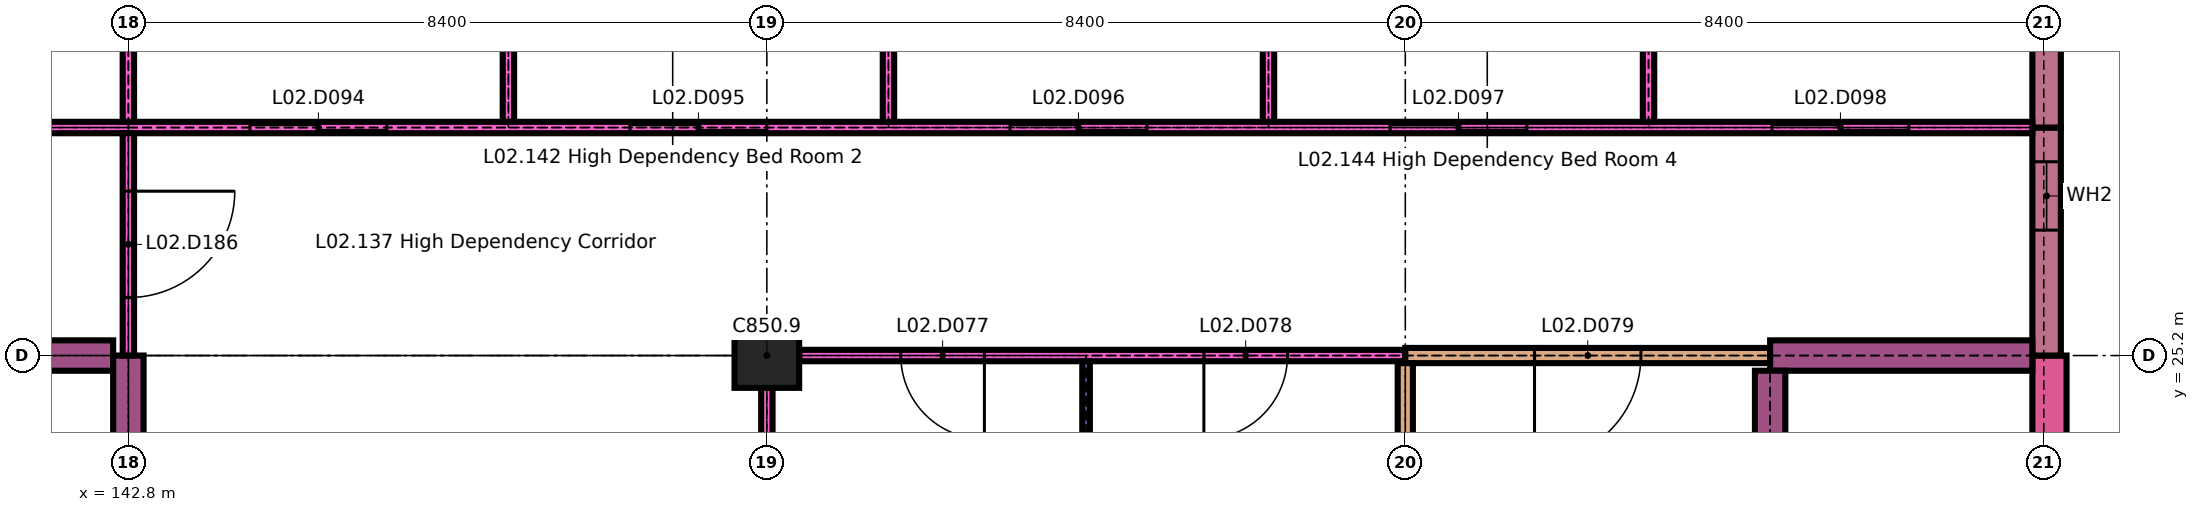
"""IFC4 building model, lengths in metres.
Left out: names, types, materials, properties, quantities, classifications, styles, units other than length and angle.
Written with IfcOpenShell. Run it as: python <this file> out.ifc"""

import sys

from ifc_helpers import new_model, si_unit, direction, frame, frame_2d, origin, origin_2d, place, context, subcontext, project, spatial, rectangle, extrude, element, fill, save


model = new_model("IFC4")
c1 = context("Model", 3, precision=1e-05, world=origin(), true_north=direction((0.0, 1.0)))
c2 = subcontext(c1, "Body", "Model", "MODEL_VIEW")
j1 = project(units=[si_unit("LENGTHUNIT", "METRE"), si_unit("PLANEANGLEUNIT", "RADIAN")], contexts=[c1])
p1 = place(None, origin())
s1 = spatial("IfcSite", under=j1, at=p1, CompositionType="ELEMENT")
p2 = place(p1, origin())
s2 = spatial("IfcBuilding", under=s1, at=p2, CompositionType="ELEMENT")
p3 = place(p2, frame((0.0, 0.0, 8.4)))
s3 = spatial("IfcBuildingStorey", under=s2, at=p3, CompositionType="ELEMENT", Elevation=8.4)
p4 = place(p3, frame((151.2, 25.2, 0.0), z_axis=(0.0, 0.0, 1.0), x_axis=(1.0, 0.0, 0.0)))
e1 = element("IfcColumn", 1, at=p4, inside=s3, PredefinedType="COLUMN", context=c2, shape_type="SweptSolid", body=[
    extrude(rectangle(XDim=0.85, YDim=0.85, at=origin_2d()), origin(), (0.0, 0.0, 1.0), 4.2),
])
p5 = place(p3, frame((168.075, 21.35, 0.0), z_axis=(0.0, 0.0, 1.0), x_axis=(0.0, 1.0, 0.0)))
e2 = element("IfcWall", 2, at=p5, inside=s3, PredefinedType="SOLIDWALL", context=c2, shape_type="SweptSolid", body=[
    extrude(rectangle(XDim=3.85, YDim=0.45, at=frame_2d((1.925, 0.0))), origin(), (0.0, 0.0, 1.0), 4.2),
])
p6 = place(p3, frame((168.038, 25.2, 0.0), z_axis=(0.0, 0.0, 1.0), x_axis=(0.0, 1.0, 0.0)))
e3 = element("IfcWall", 3, at=p6, inside=s3, PredefinedType="SOLIDWALL", context=c2, shape_type="SweptSolid", body=[
    extrude(rectangle(XDim=3.0, YDim=0.375, at=frame_2d((1.5, 0.0))), origin(), (0.0, 0.0, 1.0), 3.9),
])
p7 = place(p6, frame((1.65, 0.0, 0.9)))
e4 = element("IfcOpeningElement", 4, at=p7, cuts=e3, PredefinedType="OPENING", context=c2, shape_type="SweptSolid", body=[
    extrude(rectangle(XDim=0.9, YDim=2.1, at=frame_2d((0.45, 1.05))), frame((0.0, 0.198, 0.0), z_axis=(0.0, -1.0, 0.0), x_axis=(1.0, 0.0, 0.0)), (0.0, 0.0, 1.0), 0.395),
])
p8 = place(p3, frame((168.038, 28.2, 0.0), z_axis=(0.0, 0.0, 1.0), x_axis=(0.0, 1.0, 0.0)))
e5 = element("IfcWall", 5, at=p8, inside=s3, PredefinedType="SOLIDWALL", context=c2, shape_type="SweptSolid", body=[
    extrude(rectangle(XDim=4.975, YDim=0.375, at=frame_2d((2.488, 0.0))), origin(), (0.0, 0.0, 1.0), 3.9),
])
p9 = place(p8, frame((2.25, 0.0, 0.9)))
e6 = element("IfcOpeningElement", 6, at=p9, cuts=e5, PredefinedType="OPENING", context=c2, shape_type="SweptSolid", body=[
    extrude(rectangle(XDim=2.1, YDim=2.1, at=frame_2d((1.05, 1.05))), frame((0.0, 0.198, 0.0), z_axis=(0.0, -1.0, 0.0), x_axis=(1.0, 0.0, 0.0)), (0.0, 0.0, 1.0), 0.395),
])
p10 = place(p3, frame((117.6, 25.2, 0.0), z_axis=(0.0, 0.0, 1.0), x_axis=(1.0, 0.0, 0.0)))
e7 = element("IfcWall", 7, at=p10, inside=s3, PredefinedType="SHEAR", context=c2, shape_type="SweptSolid", body=[
    extrude(rectangle(XDim=25.0, YDim=0.4, at=frame_2d((12.5, 0.0))), origin(), (0.0, 0.0, 1.0), 4.2),
])
p11 = place(p3, frame((151.625, 25.2, 0.0), z_axis=(0.0, 0.0, 1.0), x_axis=(1.0, 0.0, 0.0)))
e8 = element("IfcWall", 8, at=p11, inside=s3, PredefinedType="PARTITIONING", context=c2, shape_type="SweptSolid", body=[
    extrude(rectangle(XDim=7.975, YDim=0.15, at=frame_2d((3.988, 0.0))), origin(), (0.0, 0.0, 1.0), 4.2),
])
p12 = place(p11, frame((1.337, 0.0, 0.0)))
e9 = element("IfcOpeningElement", 9, at=p12, cuts=e8, PredefinedType="OPENING", context=c2, shape_type="SweptSolid", body=[
    extrude(rectangle(XDim=1.1, YDim=2.1, at=frame_2d((0.55, 1.05))), frame((0.0, 0.085, 0.0), z_axis=(0.0, -1.0, 0.0), x_axis=(1.0, 0.0, 0.0)), (0.0, 0.0, 1.0), 0.17),
])
p13 = place(p11, frame((5.325, 0.0, 0.0)))
e10 = element("IfcOpeningElement", 10, at=p13, cuts=e8, PredefinedType="OPENING", context=c2, shape_type="SweptSolid", body=[
    extrude(rectangle(XDim=1.1, YDim=2.1, at=frame_2d((0.55, 1.05))), frame((0.0, 0.085, 0.0), z_axis=(0.0, -1.0, 0.0), x_axis=(1.0, 0.0, 0.0)), (0.0, 0.0, 1.0), 0.17),
])
p14 = place(p3, frame((159.6, 25.2, 0.0), z_axis=(0.0, 0.0, 1.0), x_axis=(1.0, 0.0, 0.0)))
e11 = element("IfcWall", 11, at=p14, inside=s3, PredefinedType="PARTITIONING", context=c2, shape_type="SweptSolid", body=[
    extrude(rectangle(XDim=4.8, YDim=0.2, at=frame_2d((2.4, 0.0))), origin(), (0.0, 0.0, 1.0), 4.2),
])
p15 = place(p14, frame((1.7, 0.0, 0.0)))
e12 = element("IfcOpeningElement", 12, at=p15, cuts=e11, PredefinedType="OPENING", context=c2, shape_type="SweptSolid", body=[
    extrude(rectangle(XDim=1.4, YDim=2.1, at=frame_2d((0.7, 1.05))), frame((0.0, 0.11, 0.0), z_axis=(0.0, -1.0, 0.0), x_axis=(1.0, 0.0, 0.0)), (0.0, 0.0, 1.0), 0.22),
])
p16 = place(p3, frame((164.4, 25.2, 0.0), z_axis=(0.0, 0.0, 1.0), x_axis=(1.0, 0.0, 0.0)))
e13 = element("IfcWall", 13, at=p16, inside=s3, PredefinedType="SHEAR", context=c2, shape_type="SweptSolid", body=[
    extrude(rectangle(XDim=3.45, YDim=0.4, at=frame_2d((1.725, 0.0))), origin(), (0.0, 0.0, 1.0), 4.2),
])
p17 = place(p3, frame((117.7, 28.2, 0.0), z_axis=(0.0, 0.0, 1.0), x_axis=(1.0, 0.0, 0.0)))
e14 = element("IfcWall", 14, at=p17, inside=s3, PredefinedType="PARTITIONING", context=c2, shape_type="SweptSolid", body=[
    extrude(rectangle(XDim=50.15, YDim=0.15, at=frame_2d((25.075, 0.0))), origin(), (0.0, 0.0, 1.0), 4.2),
])
p18 = place(p17, frame((1.55, 0.0, 0.0)))
e15 = element("IfcOpeningElement", 15, at=p18, cuts=e14, PredefinedType="OPENING", context=c2, shape_type="SweptSolid", body=[
    extrude(rectangle(XDim=1.8, YDim=2.4, at=frame_2d((0.9, 1.2))), frame((0.0, 0.085, 0.0), z_axis=(0.0, -1.0, 0.0), x_axis=(1.0, 0.0, 0.0)), (0.0, 0.0, 1.0), 0.17),
])
p19 = place(p17, frame((6.5, 0.0, 0.0)))
e16 = element("IfcOpeningElement", 16, at=p19, cuts=e14, PredefinedType="OPENING", context=c2, shape_type="SweptSolid", body=[
    extrude(rectangle(XDim=1.8, YDim=2.4, at=frame_2d((0.9, 1.2))), frame((0.0, 0.085, 0.0), z_axis=(0.0, -1.0, 0.0), x_axis=(1.0, 0.0, 0.0)), (0.0, 0.0, 1.0), 0.17),
])
p20 = place(p17, frame((11.5, 0.0, 0.0)))
e17 = element("IfcOpeningElement", 17, at=p20, cuts=e14, PredefinedType="OPENING", context=c2, shape_type="SweptSolid", body=[
    extrude(rectangle(XDim=1.8, YDim=2.4, at=frame_2d((0.9, 1.2))), frame((0.0, 0.085, 0.0), z_axis=(0.0, -1.0, 0.0), x_axis=(1.0, 0.0, 0.0)), (0.0, 0.0, 1.0), 0.17),
])
p21 = place(p17, frame((16.5, 0.0, 0.0)))
e18 = element("IfcOpeningElement", 18, at=p21, cuts=e14, PredefinedType="OPENING", context=c2, shape_type="SweptSolid", body=[
    extrude(rectangle(XDim=1.8, YDim=2.4, at=frame_2d((0.9, 1.2))), frame((0.0, 0.085, 0.0), z_axis=(0.0, -1.0, 0.0), x_axis=(1.0, 0.0, 0.0)), (0.0, 0.0, 1.0), 0.17),
])
p22 = place(p17, frame((21.95, 0.0, 0.0)))
e19 = element("IfcOpeningElement", 19, at=p22, cuts=e14, PredefinedType="OPENING", context=c2, shape_type="SweptSolid", body=[
    extrude(rectangle(XDim=1.1, YDim=2.1, at=frame_2d((0.55, 1.05))), frame((0.0, 0.085, 0.0), z_axis=(0.0, -1.0, 0.0), x_axis=(1.0, 0.0, 0.0)), (0.0, 0.0, 1.0), 0.17),
])
p23 = place(p17, frame((26.7, 0.0, 0.0)))
e20 = element("IfcOpeningElement", 20, at=p23, cuts=e14, PredefinedType="OPENING", context=c2, shape_type="SweptSolid", body=[
    extrude(rectangle(XDim=1.8, YDim=2.4, at=frame_2d((0.9, 1.2))), frame((0.0, 0.085, 0.0), z_axis=(0.0, -1.0, 0.0), x_axis=(1.0, 0.0, 0.0)), (0.0, 0.0, 1.0), 0.17),
])
p24 = place(p17, frame((31.7, 0.0, 0.0)))
e21 = element("IfcOpeningElement", 21, at=p24, cuts=e14, PredefinedType="OPENING", context=c2, shape_type="SweptSolid", body=[
    extrude(rectangle(XDim=1.8, YDim=2.4, at=frame_2d((0.9, 1.2))), frame((0.0, 0.085, 0.0), z_axis=(0.0, -1.0, 0.0), x_axis=(1.0, 0.0, 0.0)), (0.0, 0.0, 1.0), 0.17),
])
p25 = place(p17, frame((36.7, 0.0, 0.0)))
e22 = element("IfcOpeningElement", 22, at=p25, cuts=e14, PredefinedType="OPENING", context=c2, shape_type="SweptSolid", body=[
    extrude(rectangle(XDim=1.8, YDim=2.4, at=frame_2d((0.9, 1.2))), frame((0.0, 0.085, 0.0), z_axis=(0.0, -1.0, 0.0), x_axis=(1.0, 0.0, 0.0)), (0.0, 0.0, 1.0), 0.17),
])
p26 = place(p17, frame((41.7, 0.0, 0.0)))
e23 = element("IfcOpeningElement", 23, at=p26, cuts=e14, PredefinedType="OPENING", context=c2, shape_type="SweptSolid", body=[
    extrude(rectangle(XDim=1.8, YDim=2.4, at=frame_2d((0.9, 1.2))), frame((0.0, 0.085, 0.0), z_axis=(0.0, -1.0, 0.0), x_axis=(1.0, 0.0, 0.0)), (0.0, 0.0, 1.0), 0.17),
])
p27 = place(p17, frame((46.725, 0.0, 0.0)))
e24 = element("IfcOpeningElement", 24, at=p27, cuts=e14, PredefinedType="OPENING", context=c2, shape_type="SweptSolid", body=[
    extrude(rectangle(XDim=1.8, YDim=2.4, at=frame_2d((0.9, 1.2))), frame((0.0, 0.085, 0.0), z_axis=(0.0, -1.0, 0.0), x_axis=(1.0, 0.0, 0.0)), (0.0, 0.0, 1.0), 0.17),
])
p28 = place(p3, frame((142.8, 21.6, 0.0), z_axis=(0.0, 0.0, 1.0), x_axis=(0.0, 1.0, 0.0)))
e25 = element("IfcWall", 25, at=p28, inside=s3, PredefinedType="SHEAR", context=c2, shape_type="SweptSolid", body=[
    extrude(rectangle(XDim=3.6, YDim=0.4, at=frame_2d((1.8, 0.0))), origin(), (0.0, 0.0, 1.0), 4.2),
])
p29 = place(p3, frame((142.8, 25.2, 0.0), z_axis=(0.0, 0.0, 1.0), x_axis=(0.0, 1.0, 0.0)))
e26 = element("IfcWall", 26, at=p29, inside=s3, PredefinedType="PARTITIONING", context=c2, shape_type="SweptSolid", body=[
    extrude(rectangle(XDim=2.925, YDim=0.15, at=frame_2d((1.462, 0.0))), origin(), (0.0, 0.0, 1.0), 4.2),
])
p30 = place(p29, frame((0.762, 0.0, 0.0)))
e27 = element("IfcOpeningElement", 27, at=p30, cuts=e26, PredefinedType="OPENING", context=c2, shape_type="SweptSolid", body=[
    extrude(rectangle(XDim=1.4, YDim=2.1, at=frame_2d((0.7, 1.05))), frame((0.0, 0.085, 0.0), z_axis=(0.0, -1.0, 0.0), x_axis=(1.0, 0.0, 0.0)), (0.0, 0.0, 1.0), 0.17),
])
p31 = place(p3, frame((142.8, 28.275, 0.0), z_axis=(0.0, 0.0, 1.0), x_axis=(0.0, 1.0, 0.0)))
e28 = element("IfcWall", 28, at=p31, inside=s3, PredefinedType="PARTITIONING", context=c2, shape_type="SweptSolid", body=[
    extrude(rectangle(XDim=4.9, YDim=0.15, at=frame_2d((2.45, 0.0))), origin(), (0.0, 0.0, 1.0), 4.2),
])
p32 = place(p3, frame((147.8, 28.275, 0.0), z_axis=(0.0, 0.0, 1.0), x_axis=(0.0, 1.0, 0.0)))
e29 = element("IfcWall", 29, at=p32, inside=s3, PredefinedType="PARTITIONING", context=c2, shape_type="SweptSolid", body=[
    extrude(rectangle(XDim=5.175, YDim=0.15, at=frame_2d((2.587, 0.0))), origin(), (0.0, 0.0, 1.0), 4.2),
])
p33 = place(p3, frame((151.2, 17.225, 0.0), z_axis=(0.0, 0.0, 1.0), x_axis=(0.0, 1.0, 0.0)))
e30 = element("IfcWall", 30, at=p33, inside=s3, PredefinedType="PARTITIONING", context=c2, shape_type="SweptSolid", body=[
    extrude(rectangle(XDim=7.55, YDim=0.15, at=frame_2d((3.775, 0.0))), origin(), (0.0, 0.0, 1.0), 4.2),
])
p34 = place(p3, frame((152.8, 28.275, 0.0), z_axis=(0.0, 0.0, 1.0), x_axis=(0.0, 1.0, 0.0)))
e31 = element("IfcWall", 31, at=p34, inside=s3, PredefinedType="PARTITIONING", context=c2, shape_type="SweptSolid", body=[
    extrude(rectangle(XDim=5.175, YDim=0.15, at=frame_2d((2.587, 0.0))), origin(), (0.0, 0.0, 1.0), 4.2),
])
p35 = place(p3, frame((155.4, 16.875, 0.0), z_axis=(0.0, 0.0, 1.0), x_axis=(0.0, 1.0, 0.0)))
e32 = element("IfcWall", 32, at=p35, inside=s3, PredefinedType="PARTITIONING", context=c2, shape_type="SweptSolid", body=[
    extrude(rectangle(XDim=8.25, YDim=0.1, at=frame_2d((4.125, 0.0))), origin(), (0.0, 0.0, 1.0), 4.2),
])
p36 = place(p3, frame((157.8, 28.275, 0.0), z_axis=(0.0, 0.0, 1.0), x_axis=(0.0, 1.0, 0.0)))
e33 = element("IfcWall", 33, at=p36, inside=s3, PredefinedType="PARTITIONING", context=c2, shape_type="SweptSolid", body=[
    extrude(rectangle(XDim=5.175, YDim=0.15, at=frame_2d((2.587, 0.0))), origin(), (0.0, 0.0, 1.0), 4.2),
])
p37 = place(p3, frame((159.6, 16.9, 0.0), z_axis=(0.0, 0.0, 1.0), x_axis=(0.0, 1.0, 0.0)))
e34 = element("IfcWall", 34, at=p37, inside=s3, PredefinedType="PARTITIONING", context=c2, shape_type="SweptSolid", body=[
    extrude(rectangle(XDim=8.2, YDim=0.2, at=frame_2d((4.1, 0.0))), origin(), (0.0, 0.0, 1.0), 4.2),
])
p38 = place(p3, frame((162.8, 28.275, 0.0), z_axis=(0.0, 0.0, 1.0), x_axis=(0.0, 1.0, 0.0)))
e35 = element("IfcWall", 35, at=p38, inside=s3, PredefinedType="PARTITIONING", context=c2, shape_type="SweptSolid", body=[
    extrude(rectangle(XDim=5.175, YDim=0.15, at=frame_2d((2.587, 0.0))), origin(), (0.0, 0.0, 1.0), 4.2),
])
p39 = place(p3, frame((164.4, 17.0, 0.0), z_axis=(0.0, 0.0, 1.0), x_axis=(0.0, 1.0, 0.0)))
e36 = element("IfcWall", 36, at=p39, inside=s3, PredefinedType="SHEAR", context=c2, shape_type="SweptSolid", body=[
    extrude(rectangle(XDim=8.0, YDim=0.4, at=frame_2d((4.0, 0.0))), origin(), (0.0, 0.0, 1.0), 4.2),
])
p40 = place(p39, frame((0.4, 0.0, 0.0)))
e37 = element("IfcOpeningElement", 37, at=p40, cuts=e36, PredefinedType="OPENING", context=c2, shape_type="SweptSolid", body=[
    extrude(rectangle(XDim=1.2, YDim=2.1, at=frame_2d((0.6, 1.05))), frame((0.0, 0.21, 0.0), z_axis=(0.0, -1.0, 0.0), x_axis=(1.0, 0.0, 0.0)), (0.0, 0.0, 1.0), 0.42),
])
p41 = place(p7, origin())
e38 = element("IfcWindow", 38, at=p41, inside=s3, PartitioningType="SINGLE_PANEL", PredefinedType="WINDOW", context=c2, shape_type="SweptSolid", body=[
    extrude(rectangle(XDim=0.9, YDim=2.1, at=frame_2d((0.45, 1.05))), frame((0.0, 0.03, 0.0), z_axis=(0.0, -1.0, 0.0), x_axis=(1.0, 0.0, 0.0)), (0.0, 0.0, 1.0), 0.06),
])
fill(e4, e38)
p42 = place(p12, origin())
e39 = element("IfcDoor", 39, at=p42, inside=s3, OperationType="SINGLE_SWING_RIGHT", PredefinedType="DOOR", context=c2, shape_type="SweptSolid", body=[
    extrude(rectangle(XDim=1.1, YDim=2.1, at=frame_2d((0.55, 1.05))), frame((0.0, 0.025, 0.0), z_axis=(0.0, -1.0, 0.0), x_axis=(1.0, 0.0, 0.0)), (0.0, 0.0, 1.0), 0.05),
])
fill(e9, e39)
p43 = place(p13, origin())
e40 = element("IfcDoor", 40, at=p43, inside=s3, OperationType="SINGLE_SWING_LEFT", PredefinedType="DOOR", context=c2, shape_type="SweptSolid", body=[
    extrude(rectangle(XDim=1.1, YDim=2.1, at=frame_2d((0.55, 1.05))), frame((0.0, 0.025, 0.0), z_axis=(0.0, -1.0, 0.0), x_axis=(1.0, 0.0, 0.0)), (0.0, 0.0, 1.0), 0.05),
])
fill(e10, e40)
p44 = place(p15, origin())
e41 = element("IfcDoor", 41, at=p44, inside=s3, OperationType="SINGLE_SWING_LEFT", PredefinedType="DOOR", context=c2, shape_type="SweptSolid", body=[
    extrude(rectangle(XDim=1.4, YDim=2.1, at=frame_2d((0.7, 1.05))), frame((0.0, 0.03, 0.0), z_axis=(0.0, -1.0, 0.0), x_axis=(1.0, 0.0, 0.0)), (0.0, 0.0, 1.0), 0.06),
])
fill(e12, e41)
p45 = place(p23, origin())
e42 = element("IfcDoor", 42, at=p45, inside=s3, OperationType="DOUBLE_DOOR_SLIDING", PredefinedType="DOOR", context=c2, shape_type="SweptSolid", body=[
    extrude(rectangle(XDim=1.8, YDim=2.4, at=frame_2d((0.9, 1.2))), frame((0.0, 0.035, 0.0), z_axis=(0.0, -1.0, 0.0), x_axis=(1.0, 0.0, 0.0)), (0.0, 0.0, 1.0), 0.07),
])
fill(e20, e42)
p46 = place(p24, origin())
e43 = element("IfcDoor", 43, at=p46, inside=s3, OperationType="DOUBLE_DOOR_SLIDING", PredefinedType="DOOR", context=c2, shape_type="SweptSolid", body=[
    extrude(rectangle(XDim=1.8, YDim=2.4, at=frame_2d((0.9, 1.2))), frame((0.0, 0.035, 0.0), z_axis=(0.0, -1.0, 0.0), x_axis=(1.0, 0.0, 0.0)), (0.0, 0.0, 1.0), 0.07),
])
fill(e21, e43)
p47 = place(p25, origin())
e44 = element("IfcDoor", 44, at=p47, inside=s3, OperationType="DOUBLE_DOOR_SLIDING", PredefinedType="DOOR", context=c2, shape_type="SweptSolid", body=[
    extrude(rectangle(XDim=1.8, YDim=2.4, at=frame_2d((0.9, 1.2))), frame((0.0, 0.035, 0.0), z_axis=(0.0, -1.0, 0.0), x_axis=(1.0, 0.0, 0.0)), (0.0, 0.0, 1.0), 0.07),
])
fill(e22, e44)
p48 = place(p26, origin())
e45 = element("IfcDoor", 45, at=p48, inside=s3, OperationType="DOUBLE_DOOR_SLIDING", PredefinedType="DOOR", context=c2, shape_type="SweptSolid", body=[
    extrude(rectangle(XDim=1.8, YDim=2.4, at=frame_2d((0.9, 1.2))), frame((0.0, 0.035, 0.0), z_axis=(0.0, -1.0, 0.0), x_axis=(1.0, 0.0, 0.0)), (0.0, 0.0, 1.0), 0.07),
])
fill(e23, e45)
p49 = place(p27, origin())
e46 = element("IfcDoor", 46, at=p49, inside=s3, OperationType="DOUBLE_DOOR_SLIDING", PredefinedType="DOOR", context=c2, shape_type="SweptSolid", body=[
    extrude(rectangle(XDim=1.8, YDim=2.4, at=frame_2d((0.9, 1.2))), frame((0.0, 0.035, 0.0), z_axis=(0.0, -1.0, 0.0), x_axis=(1.0, 0.0, 0.0)), (0.0, 0.0, 1.0), 0.07),
])
fill(e24, e46)
p50 = place(p30, origin())
e47 = element("IfcDoor", 47, at=p50, inside=s3, OperationType="SINGLE_SWING_RIGHT", PredefinedType="DOOR", context=c2, shape_type="SweptSolid", body=[
    extrude(rectangle(XDim=1.4, YDim=2.1, at=frame_2d((0.7, 1.05))), frame((0.0, 0.025, 0.0), z_axis=(0.0, -1.0, 0.0), x_axis=(1.0, 0.0, 0.0)), (0.0, 0.0, 1.0), 0.05),
])
fill(e27, e47)
save(model, sys.argv[1])
